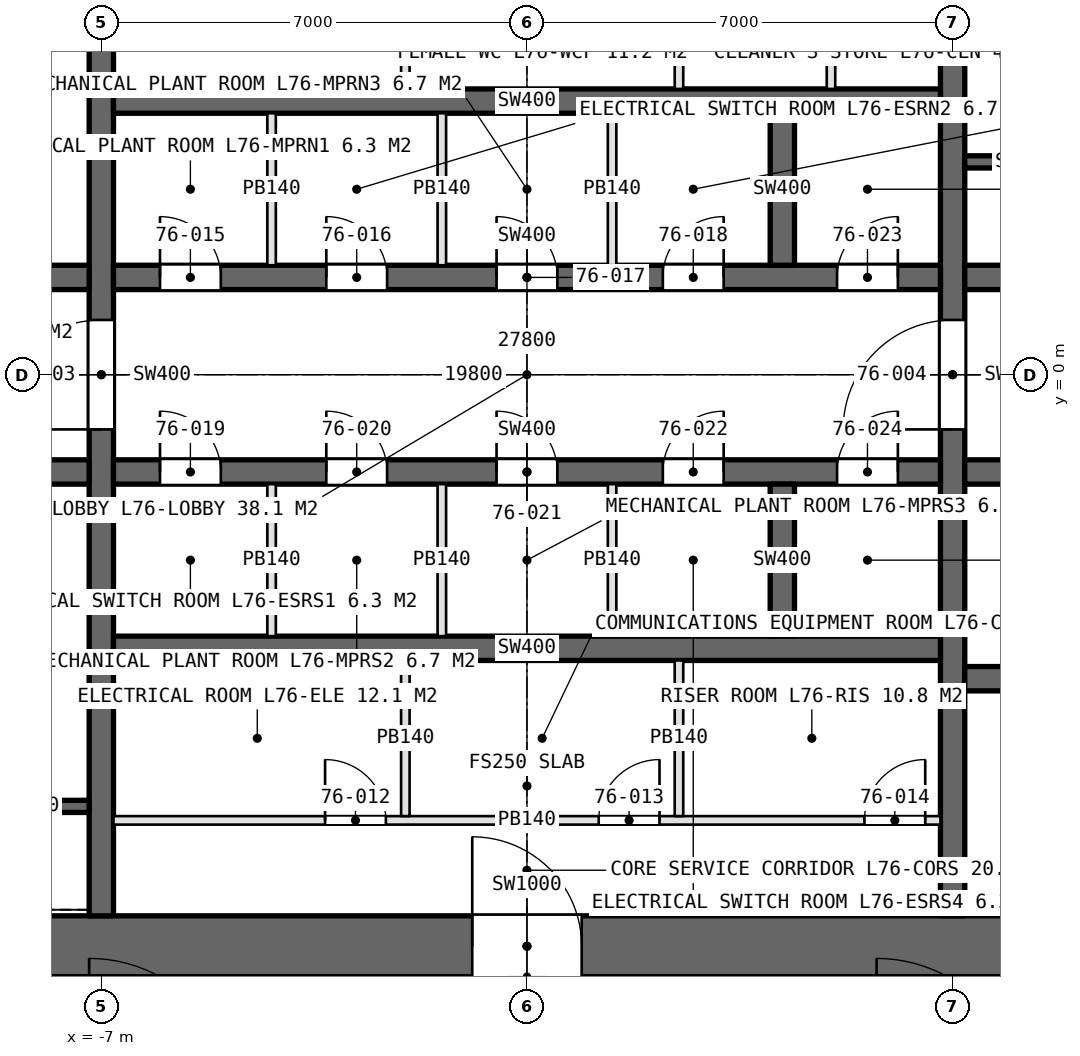
"""IFC4 building model, lengths in metres.
Left out: names, types, materials, properties, quantities, classifications, styles, units other than length and angle.
Written with IfcOpenShell. Run it as: python <this file> out.ifc"""

import sys

from ifc_helpers import new_model, si_unit, direction, frame, frame_2d, origin, place, context, subcontext, project, spatial, rectangle, extrude, element, fill, save


model = new_model("IFC4")
c1 = context("Model", 3, precision=1e-05, world=origin(), true_north=direction((0.0, 1.0)))
c2 = subcontext(c1, "Body", "Model", "MODEL_VIEW")
j1 = project(units=[si_unit("LENGTHUNIT", "METRE"), si_unit("PLANEANGLEUNIT", "RADIAN")], contexts=[c1])
p1 = place(None, origin())
s1 = spatial("IfcSite", under=j1, at=p1, CompositionType="ELEMENT")
p2 = place(p1, origin())
s2 = spatial("IfcBuilding", under=s1, at=p2, CompositionType="ELEMENT")
p3 = place(p2, frame((0.0, 0.0, 339.2)))
s3 = spatial("IfcBuildingStorey", under=s2, at=p3, CompositionType="ELEMENT", Elevation=339.2)
p4 = place(p3, frame((-13.9, -9.4, 0.0), z_axis=(0.0, 0.0, 1.0), x_axis=(1.0, 0.0, 0.0)))
e1 = element("IfcWall", 1, at=p4, inside=s3, PredefinedType="SHEAR", context=c2, shape_type="SweptSolid", body=[
    extrude(rectangle(XDim=27.8, YDim=1.0, at=frame_2d((13.9, 0.0))), origin(), (0.0, 0.0, 1.0), 5.0),
])
p5 = place(p4, frame((13.0, 0.0, 0.0)))
e2 = element("IfcOpeningElement", 2, at=p5, cuts=e1, PredefinedType="OPENING", context=c2, shape_type="SweptSolid", body=[
    extrude(rectangle(XDim=1.8, YDim=2.4, at=frame_2d((0.9, 1.2))), frame((0.0, 0.51, 0.0), z_axis=(0.0, -1.0, 0.0), x_axis=(1.0, 0.0, 0.0)), (0.0, 0.0, 1.0), 1.02),
])
p6 = place(p4, frame((22.95, 0.0, 0.0)))
e3 = element("IfcOpeningElement", 3, at=p6, cuts=e1, PredefinedType="OPENING", context=c2, shape_type="SweptSolid", body=[
    extrude(rectangle(XDim=2.2, YDim=2.7, at=frame_2d((1.1, 1.35))), frame((0.0, 0.51, 0.0), z_axis=(0.0, -1.0, 0.0), x_axis=(1.0, 0.0, 0.0)), (0.0, 0.0, 1.0), 1.02),
])
p7 = place(p3, frame((-7.0, -8.9, 0.0), z_axis=(0.0, 0.0, 1.0), x_axis=(0.0, 1.0, 0.0)))
e4 = element("IfcWall", 4, at=p7, inside=s3, PredefinedType="SHEAR", context=c2, shape_type="SweptSolid", body=[
    extrude(rectangle(XDim=17.8, YDim=0.4, at=frame_2d((8.9, 0.0))), origin(), (0.0, 0.0, 1.0), 5.0),
])
p8 = place(p7, frame((8.0, 0.0, 0.0)))
e5 = element("IfcOpeningElement", 5, at=p8, cuts=e4, PredefinedType="OPENING", context=c2, shape_type="SweptSolid", body=[
    extrude(rectangle(XDim=1.8, YDim=2.4, at=frame_2d((0.9, 1.2))), frame((0.0, 0.21, 0.0), z_axis=(0.0, -1.0, 0.0), x_axis=(1.0, 0.0, 0.0)), (0.0, 0.0, 1.0), 0.42),
])
p9 = place(p3, frame((7.0, -8.9, 0.0), z_axis=(0.0, 0.0, 1.0), x_axis=(0.0, 1.0, 0.0)))
e6 = element("IfcWall", 6, at=p9, inside=s3, PredefinedType="SHEAR", context=c2, shape_type="SweptSolid", body=[
    extrude(rectangle(XDim=17.8, YDim=0.4, at=frame_2d((8.9, 0.0))), origin(), (0.0, 0.0, 1.0), 5.0),
])
p10 = place(p9, frame((8.0, 0.0, 0.0)))
e7 = element("IfcOpeningElement", 7, at=p10, cuts=e6, PredefinedType="OPENING", context=c2, shape_type="SweptSolid", body=[
    extrude(rectangle(XDim=1.8, YDim=2.4, at=frame_2d((0.9, 1.2))), frame((0.0, 0.21, 0.0), z_axis=(0.0, -1.0, 0.0), x_axis=(1.0, 0.0, 0.0)), (0.0, 0.0, 1.0), 0.42),
])
p11 = place(p3, frame((-6.8, 1.6, 0.0), z_axis=(0.0, 0.0, 1.0), x_axis=(1.0, 0.0, 0.0)))
e8 = element("IfcWall", 8, at=p11, inside=s3, PredefinedType="SHEAR", context=c2, shape_type="SweptSolid", body=[
    extrude(rectangle(XDim=13.6, YDim=0.4, at=frame_2d((6.8, 0.0))), origin(), (0.0, 0.0, 1.0), 5.0),
])
p12 = place(p11, frame((0.765, 0.0, 0.0)))
e9 = element("IfcOpeningElement", 9, at=p12, cuts=e8, PredefinedType="OPENING", context=c2, shape_type="SweptSolid", body=[
    extrude(rectangle(XDim=1.0, YDim=2.4, at=frame_2d((0.5, 1.2))), frame((0.0, 0.21, 0.0), z_axis=(0.0, -1.0, 0.0), x_axis=(1.0, 0.0, 0.0)), (0.0, 0.0, 1.0), 0.42),
])
p13 = place(p11, frame((3.5, 0.0, 0.0)))
e10 = element("IfcOpeningElement", 10, at=p13, cuts=e8, PredefinedType="OPENING", context=c2, shape_type="SweptSolid", body=[
    extrude(rectangle(XDim=1.0, YDim=2.4, at=frame_2d((0.5, 1.2))), frame((0.0, 0.21, 0.0), z_axis=(0.0, -1.0, 0.0), x_axis=(1.0, 0.0, 0.0)), (0.0, 0.0, 1.0), 0.42),
])
p14 = place(p11, frame((6.3, 0.0, 0.0)))
e11 = element("IfcOpeningElement", 11, at=p14, cuts=e8, PredefinedType="OPENING", context=c2, shape_type="SweptSolid", body=[
    extrude(rectangle(XDim=1.0, YDim=2.4, at=frame_2d((0.5, 1.2))), frame((0.0, 0.21, 0.0), z_axis=(0.0, -1.0, 0.0), x_axis=(1.0, 0.0, 0.0)), (0.0, 0.0, 1.0), 0.42),
])
p15 = place(p11, frame((9.035, 0.0, 0.0)))
e12 = element("IfcOpeningElement", 12, at=p15, cuts=e8, PredefinedType="OPENING", context=c2, shape_type="SweptSolid", body=[
    extrude(rectangle(XDim=1.0, YDim=2.4, at=frame_2d((0.5, 1.2))), frame((0.0, 0.21, 0.0), z_axis=(0.0, -1.0, 0.0), x_axis=(1.0, 0.0, 0.0)), (0.0, 0.0, 1.0), 0.42),
])
p16 = place(p11, frame((11.9, 0.0, 0.0)))
e13 = element("IfcOpeningElement", 13, at=p16, cuts=e8, PredefinedType="OPENING", context=c2, shape_type="SweptSolid", body=[
    extrude(rectangle(XDim=1.0, YDim=2.4, at=frame_2d((0.5, 1.2))), frame((0.0, 0.21, 0.0), z_axis=(0.0, -1.0, 0.0), x_axis=(1.0, 0.0, 0.0)), (0.0, 0.0, 1.0), 0.42),
])
p17 = place(p3, frame((-6.8, -1.6, 0.0), z_axis=(0.0, 0.0, 1.0), x_axis=(1.0, 0.0, 0.0)))
e14 = element("IfcWall", 14, at=p17, inside=s3, PredefinedType="SHEAR", context=c2, shape_type="SweptSolid", body=[
    extrude(rectangle(XDim=13.6, YDim=0.4, at=frame_2d((6.8, 0.0))), origin(), (0.0, 0.0, 1.0), 5.0),
])
p18 = place(p17, frame((0.765, 0.0, 0.0)))
e15 = element("IfcOpeningElement", 15, at=p18, cuts=e14, PredefinedType="OPENING", context=c2, shape_type="SweptSolid", body=[
    extrude(rectangle(XDim=1.0, YDim=2.4, at=frame_2d((0.5, 1.2))), frame((0.0, 0.21, 0.0), z_axis=(0.0, -1.0, 0.0), x_axis=(1.0, 0.0, 0.0)), (0.0, 0.0, 1.0), 0.42),
])
p19 = place(p17, frame((3.5, 0.0, 0.0)))
e16 = element("IfcOpeningElement", 16, at=p19, cuts=e14, PredefinedType="OPENING", context=c2, shape_type="SweptSolid", body=[
    extrude(rectangle(XDim=1.0, YDim=2.4, at=frame_2d((0.5, 1.2))), frame((0.0, 0.21, 0.0), z_axis=(0.0, -1.0, 0.0), x_axis=(1.0, 0.0, 0.0)), (0.0, 0.0, 1.0), 0.42),
])
p20 = place(p17, frame((6.3, 0.0, 0.0)))
e17 = element("IfcOpeningElement", 17, at=p20, cuts=e14, PredefinedType="OPENING", context=c2, shape_type="SweptSolid", body=[
    extrude(rectangle(XDim=1.0, YDim=2.4, at=frame_2d((0.5, 1.2))), frame((0.0, 0.21, 0.0), z_axis=(0.0, -1.0, 0.0), x_axis=(1.0, 0.0, 0.0)), (0.0, 0.0, 1.0), 0.42),
])
p21 = place(p17, frame((9.035, 0.0, 0.0)))
e18 = element("IfcOpeningElement", 18, at=p21, cuts=e14, PredefinedType="OPENING", context=c2, shape_type="SweptSolid", body=[
    extrude(rectangle(XDim=1.0, YDim=2.4, at=frame_2d((0.5, 1.2))), frame((0.0, 0.21, 0.0), z_axis=(0.0, -1.0, 0.0), x_axis=(1.0, 0.0, 0.0)), (0.0, 0.0, 1.0), 0.42),
])
p22 = place(p17, frame((11.9, 0.0, 0.0)))
e19 = element("IfcOpeningElement", 19, at=p22, cuts=e14, PredefinedType="OPENING", context=c2, shape_type="SweptSolid", body=[
    extrude(rectangle(XDim=1.0, YDim=2.4, at=frame_2d((0.5, 1.2))), frame((0.0, 0.21, 0.0), z_axis=(0.0, -1.0, 0.0), x_axis=(1.0, 0.0, 0.0)), (0.0, 0.0, 1.0), 0.42),
])
for number, where, z_axis, x_axis in (
    (20, (-6.8, 4.5, 0.0), (0.0, 0.0, 1.0), (1.0, 0.0, 0.0)),
    (21, (-6.8, -4.5, 0.0), (0.0, 0.0, 1.0), (1.0, 0.0, 0.0)),
):
    element("IfcWall", number, at=place(p3, frame(where, z_axis=z_axis, x_axis=x_axis)), inside=s3, PredefinedType="SHEAR", context=c2, shape_type="SweptSolid", body=[
        extrude(rectangle(XDim=13.6, YDim=0.4, at=frame_2d((6.8, 0.0))), origin(), (0.0, 0.0, 1.0), 5.0),
    ])
for number, where, z_axis, x_axis in (
    (22, (-12.9, 1.6, 0.0), (0.0, 0.0, 1.0), (1.0, 0.0, 0.0)),
    (23, (-12.9, -1.6, 0.0), (0.0, 0.0, 1.0), (1.0, 0.0, 0.0)),
):
    element("IfcWall", number, at=place(p3, frame(where, z_axis=z_axis, x_axis=x_axis)), inside=s3, PredefinedType="SHEAR", context=c2, shape_type="SweptSolid", body=[
        extrude(rectangle(XDim=5.7, YDim=0.4, at=frame_2d((2.85, 0.0))), origin(), (0.0, 0.0, 1.0), 5.0),
    ])
p23 = place(p3, frame((7.2, 1.6, 0.0), z_axis=(0.0, 0.0, 1.0), x_axis=(1.0, 0.0, 0.0)))
e24 = element("IfcWall", 24, at=p23, inside=s3, PredefinedType="SHEAR", context=c2, shape_type="SweptSolid", body=[
    extrude(rectangle(XDim=5.7, YDim=0.4, at=frame_2d((2.85, 0.0))), origin(), (0.0, 0.0, 1.0), 5.0),
])
p24 = place(p23, frame((0.7, 0.0, 0.0)))
e25 = element("IfcOpeningElement", 25, at=p24, cuts=e24, PredefinedType="OPENING", context=c2, shape_type="SweptSolid", body=[
    extrude(rectangle(XDim=1.0, YDim=2.4, at=frame_2d((0.5, 1.2))), frame((0.0, 0.21, 0.0), z_axis=(0.0, -1.0, 0.0), x_axis=(1.0, 0.0, 0.0)), (0.0, 0.0, 1.0), 0.42),
])
p25 = place(p3, frame((7.2, -1.6, 0.0), z_axis=(0.0, 0.0, 1.0), x_axis=(1.0, 0.0, 0.0)))
e26 = element("IfcWall", 26, at=p25, inside=s3, PredefinedType="SHEAR", context=c2, shape_type="SweptSolid", body=[
    extrude(rectangle(XDim=5.7, YDim=0.4, at=frame_2d((2.85, 0.0))), origin(), (0.0, 0.0, 1.0), 5.0),
])
p26 = place(p25, frame((0.9, 0.0, 0.0)))
e27 = element("IfcOpeningElement", 27, at=p26, cuts=e26, PredefinedType="OPENING", context=c2, shape_type="SweptSolid", body=[
    extrude(rectangle(XDim=1.3, YDim=2.4, at=frame_2d((0.65, 1.2))), frame((0.0, 0.21, 0.0), z_axis=(0.0, -1.0, 0.0), x_axis=(1.0, 0.0, 0.0)), (0.0, 0.0, 1.0), 0.42),
])
p27 = place(p25, frame((3.95, 0.0, 0.0)))
e28 = element("IfcOpeningElement", 28, at=p27, cuts=e26, PredefinedType="OPENING", context=c2, shape_type="SweptSolid", body=[
    extrude(rectangle(XDim=1.3, YDim=2.4, at=frame_2d((0.65, 1.2))), frame((0.0, 0.21, 0.0), z_axis=(0.0, -1.0, 0.0), x_axis=(1.0, 0.0, 0.0)), (0.0, 0.0, 1.0), 0.42),
])
p28 = place(p3, frame((7.2, -5.0, 0.0), z_axis=(0.0, 0.0, 1.0), x_axis=(1.0, 0.0, 0.0)))
e29 = element("IfcWall", 29, at=p28, inside=s3, PredefinedType="SHEAR", context=c2, shape_type="SweptSolid", body=[
    extrude(rectangle(XDim=5.7, YDim=0.4, at=frame_2d((2.85, 0.0))), origin(), (0.0, 0.0, 1.0), 5.0),
])
for number, where, z_axis, x_axis in (
    (30, (4.2, 1.8, 0.0), (0.0, 0.0, 1.0), (0.0, 1.0, 0.0)),
    (31, (4.2, -4.3, 0.0), (0.0, 0.0, 1.0), (0.0, 1.0, 0.0)),
):
    element("IfcWall", number, at=place(p3, frame(where, z_axis=z_axis, x_axis=x_axis)), inside=s3, PredefinedType="SHEAR", context=c2, shape_type="SweptSolid", body=[
        extrude(rectangle(XDim=2.5, YDim=0.4, at=frame_2d((1.25, 0.0))), origin(), (0.0, 0.0, 1.0), 5.0),
    ])
for number, where, z_axis, x_axis in (
    (32, (-2.0, 4.7, 0.0), (0.0, 0.0, 1.0), (0.0, 1.0, 0.0)),
    (33, (2.5, 4.7, 0.0), (0.0, 0.0, 1.0), (0.0, 1.0, 0.0)),
    (34, (5.0, 4.7, 0.0), (0.0, 0.0, 1.0), (0.0, 1.0, 0.0)),
):
    element("IfcWall", number, at=place(p3, frame(where, z_axis=z_axis, x_axis=x_axis)), inside=s3, PredefinedType="PARTITIONING", context=c2, shape_type="SweptSolid", body=[
        extrude(rectangle(XDim=2.56, YDim=0.14, at=frame_2d((1.28, 0.0))), origin(), (0.0, 0.0, 1.0), 4.75),
    ])
p29 = place(p3, frame((-6.8, -7.33, 0.0), z_axis=(0.0, 0.0, 1.0), x_axis=(1.0, 0.0, 0.0)))
e35 = element("IfcWall", 35, at=p29, inside=s3, PredefinedType="PARTITIONING", context=c2, shape_type="SweptSolid", body=[
    extrude(rectangle(XDim=13.6, YDim=0.14, at=frame_2d((6.8, 0.0))), origin(), (0.0, 0.0, 1.0), 4.75),
])
p30 = place(p29, frame((3.48, 0.0, 0.0)))
e36 = element("IfcOpeningElement", 36, at=p30, cuts=e35, PredefinedType="OPENING", context=c2, shape_type="SweptSolid", body=[
    extrude(rectangle(XDim=1.0, YDim=2.4, at=frame_2d((0.5, 1.2))), frame((0.0, 0.08, 0.0), z_axis=(0.0, -1.0, 0.0), x_axis=(1.0, 0.0, 0.0)), (0.0, 0.0, 1.0), 0.16),
])
p31 = place(p29, frame((7.98, 0.0, 0.0)))
e37 = element("IfcOpeningElement", 37, at=p31, cuts=e35, PredefinedType="OPENING", context=c2, shape_type="SweptSolid", body=[
    extrude(rectangle(XDim=1.0, YDim=2.4, at=frame_2d((0.5, 1.2))), frame((0.0, 0.08, 0.0), z_axis=(0.0, -1.0, 0.0), x_axis=(1.0, 0.0, 0.0)), (0.0, 0.0, 1.0), 0.16),
])
p32 = place(p29, frame((12.35, 0.0, 0.0)))
e38 = element("IfcOpeningElement", 38, at=p32, cuts=e35, PredefinedType="OPENING", context=c2, shape_type="SweptSolid", body=[
    extrude(rectangle(XDim=1.0, YDim=2.4, at=frame_2d((0.5, 1.2))), frame((0.0, 0.08, 0.0), z_axis=(0.0, -1.0, 0.0), x_axis=(1.0, 0.0, 0.0)), (0.0, 0.0, 1.0), 0.16),
])
for number, where, z_axis, x_axis in (
    (39, (-2.0, -4.7, 0.0), (0.0, 0.0, 1.0), (0.0, -1.0, 0.0)),
    (40, (2.5, -4.7, 0.0), (0.0, 0.0, 1.0), (0.0, -1.0, 0.0)),
):
    element("IfcWall", number, at=place(p3, frame(where, z_axis=z_axis, x_axis=x_axis)), inside=s3, PredefinedType="PARTITIONING", context=c2, shape_type="SweptSolid", body=[
        extrude(rectangle(XDim=2.56, YDim=0.14, at=frame_2d((1.28, 0.0))), origin(), (0.0, 0.0, 1.0), 4.75),
    ])
for number, where, z_axis, x_axis in (
    (41, (-4.2, 1.8, 0.0), (0.0, 0.0, 1.0), (0.0, 1.0, 0.0)),
    (42, (-1.4, 1.8, 0.0), (0.0, 0.0, 1.0), (0.0, 1.0, 0.0)),
    (43, (1.4, 1.8, 0.0), (0.0, 0.0, 1.0), (0.0, 1.0, 0.0)),
    (44, (-4.2, -1.8, 0.0), (0.0, 0.0, 1.0), (0.0, -1.0, 0.0)),
    (45, (-1.4, -1.8, 0.0), (0.0, 0.0, 1.0), (0.0, -1.0, 0.0)),
    (46, (1.4, -1.8, 0.0), (0.0, 0.0, 1.0), (0.0, -1.0, 0.0)),
):
    element("IfcWall", number, at=place(p3, frame(where, z_axis=z_axis, x_axis=x_axis)), inside=s3, PredefinedType="PARTITIONING", context=c2, shape_type="SweptSolid", body=[
        extrude(rectangle(XDim=2.5, YDim=0.14, at=frame_2d((1.25, 0.0))), origin(), (0.0, 0.0, 1.0), 4.75),
    ])
for number, where, z_axis, x_axis in (
    (47, (-9.15, -7.1, 0.0), (0.0, 0.0, 1.0), (1.0, 0.0, 0.0)),
    (48, (9.15, 3.5, 0.0), (0.0, 0.0, 1.0), (-1.0, 0.0, 0.0)),
):
    element("IfcWall", number, at=place(p3, frame(where, z_axis=z_axis, x_axis=x_axis)), inside=s3, PredefinedType="SOLIDWALL", context=c2, shape_type="SweptSolid", body=[
        extrude(rectangle(XDim=1.95, YDim=0.2, at=frame_2d((0.975, 0.0))), origin(), (0.0, 0.0, 1.0), 5.0),
    ])
p33 = place(p8, origin())
e49 = element("IfcDoor", 49, at=p33, inside=s3, OperationType="DOUBLE_DOOR_SINGLE_SWING", PredefinedType="DOOR", context=c2, shape_type="SweptSolid", body=[
    extrude(rectangle(XDim=1.8, YDim=2.4, at=frame_2d((0.9, 1.2))), frame((0.0, 0.025, 0.0), z_axis=(0.0, -1.0, 0.0), x_axis=(1.0, 0.0, 0.0)), (0.0, 0.0, 1.0), 0.05),
])
fill(e5, e49)
p34 = place(p10, origin())
e50 = element("IfcDoor", 50, at=p34, inside=s3, OperationType="DOUBLE_DOOR_SINGLE_SWING", PredefinedType="DOOR", context=c2, shape_type="SweptSolid", body=[
    extrude(rectangle(XDim=1.8, YDim=2.4, at=frame_2d((0.9, 1.2))), frame((0.0, 0.025, 0.0), z_axis=(0.0, -1.0, 0.0), x_axis=(1.0, 0.0, 0.0)), (0.0, 0.0, 1.0), 0.05),
])
fill(e7, e50)
p35 = place(p30, origin())
e51 = element("IfcDoor", 51, at=p35, inside=s3, OperationType="SINGLE_SWING_LEFT", PredefinedType="DOOR", context=c2, shape_type="SweptSolid", body=[
    extrude(rectangle(XDim=1.0, YDim=2.4, at=frame_2d((0.5, 1.2))), frame((0.0, 0.025, 0.0), z_axis=(0.0, -1.0, 0.0), x_axis=(1.0, 0.0, 0.0)), (0.0, 0.0, 1.0), 0.05),
])
fill(e36, e51)
p36 = place(p31, origin())
e52 = element("IfcDoor", 52, at=p36, inside=s3, OperationType="SINGLE_SWING_RIGHT", PredefinedType="DOOR", context=c2, shape_type="SweptSolid", body=[
    extrude(rectangle(XDim=1.0, YDim=2.4, at=frame_2d((0.5, 1.2))), frame((0.0, 0.025, 0.0), z_axis=(0.0, -1.0, 0.0), x_axis=(1.0, 0.0, 0.0)), (0.0, 0.0, 1.0), 0.05),
])
fill(e37, e52)
p37 = place(p32, origin())
e53 = element("IfcDoor", 53, at=p37, inside=s3, OperationType="SINGLE_SWING_RIGHT", PredefinedType="DOOR", context=c2, shape_type="SweptSolid", body=[
    extrude(rectangle(XDim=1.0, YDim=2.4, at=frame_2d((0.5, 1.2))), frame((0.0, 0.025, 0.0), z_axis=(0.0, -1.0, 0.0), x_axis=(1.0, 0.0, 0.0)), (0.0, 0.0, 1.0), 0.05),
])
fill(e38, e53)
p38 = place(p12, origin())
e54 = element("IfcDoor", 54, at=p38, inside=s3, OperationType="SINGLE_SWING_LEFT", PredefinedType="DOOR", context=c2, shape_type="SweptSolid", body=[
    extrude(rectangle(XDim=1.0, YDim=2.4, at=frame_2d((0.5, 1.2))), frame((0.0, 0.025, 0.0), z_axis=(0.0, -1.0, 0.0), x_axis=(1.0, 0.0, 0.0)), (0.0, 0.0, 1.0), 0.05),
])
fill(e9, e54)
p39 = place(p13, origin())
e55 = element("IfcDoor", 55, at=p39, inside=s3, OperationType="SINGLE_SWING_LEFT", PredefinedType="DOOR", context=c2, shape_type="SweptSolid", body=[
    extrude(rectangle(XDim=1.0, YDim=2.4, at=frame_2d((0.5, 1.2))), frame((0.0, 0.025, 0.0), z_axis=(0.0, -1.0, 0.0), x_axis=(1.0, 0.0, 0.0)), (0.0, 0.0, 1.0), 0.05),
])
fill(e10, e55)
p40 = place(p14, origin())
e56 = element("IfcDoor", 56, at=p40, inside=s3, OperationType="SINGLE_SWING_LEFT", PredefinedType="DOOR", context=c2, shape_type="SweptSolid", body=[
    extrude(rectangle(XDim=1.0, YDim=2.4, at=frame_2d((0.5, 1.2))), frame((0.0, 0.025, 0.0), z_axis=(0.0, -1.0, 0.0), x_axis=(1.0, 0.0, 0.0)), (0.0, 0.0, 1.0), 0.05),
])
fill(e11, e56)
p41 = place(p15, origin())
e57 = element("IfcDoor", 57, at=p41, inside=s3, OperationType="SINGLE_SWING_RIGHT", PredefinedType="DOOR", context=c2, shape_type="SweptSolid", body=[
    extrude(rectangle(XDim=1.0, YDim=2.4, at=frame_2d((0.5, 1.2))), frame((0.0, 0.025, 0.0), z_axis=(0.0, -1.0, 0.0), x_axis=(1.0, 0.0, 0.0)), (0.0, 0.0, 1.0), 0.05),
])
fill(e12, e57)
p42 = place(p18, origin())
e58 = element("IfcDoor", 58, at=p42, inside=s3, OperationType="SINGLE_SWING_LEFT", PredefinedType="DOOR", context=c2, shape_type="SweptSolid", body=[
    extrude(rectangle(XDim=1.0, YDim=2.4, at=frame_2d((0.5, 1.2))), frame((0.0, 0.025, 0.0), z_axis=(0.0, -1.0, 0.0), x_axis=(1.0, 0.0, 0.0)), (0.0, 0.0, 1.0), 0.05),
])
fill(e15, e58)
p43 = place(p19, origin())
e59 = element("IfcDoor", 59, at=p43, inside=s3, OperationType="SINGLE_SWING_LEFT", PredefinedType="DOOR", context=c2, shape_type="SweptSolid", body=[
    extrude(rectangle(XDim=1.0, YDim=2.4, at=frame_2d((0.5, 1.2))), frame((0.0, 0.025, 0.0), z_axis=(0.0, -1.0, 0.0), x_axis=(1.0, 0.0, 0.0)), (0.0, 0.0, 1.0), 0.05),
])
fill(e16, e59)
p44 = place(p20, origin())
e60 = element("IfcDoor", 60, at=p44, inside=s3, OperationType="SINGLE_SWING_LEFT", PredefinedType="DOOR", context=c2, shape_type="SweptSolid", body=[
    extrude(rectangle(XDim=1.0, YDim=2.4, at=frame_2d((0.5, 1.2))), frame((0.0, 0.025, 0.0), z_axis=(0.0, -1.0, 0.0), x_axis=(1.0, 0.0, 0.0)), (0.0, 0.0, 1.0), 0.05),
])
fill(e17, e60)
p45 = place(p21, origin())
e61 = element("IfcDoor", 61, at=p45, inside=s3, OperationType="SINGLE_SWING_RIGHT", PredefinedType="DOOR", context=c2, shape_type="SweptSolid", body=[
    extrude(rectangle(XDim=1.0, YDim=2.4, at=frame_2d((0.5, 1.2))), frame((0.0, 0.025, 0.0), z_axis=(0.0, -1.0, 0.0), x_axis=(1.0, 0.0, 0.0)), (0.0, 0.0, 1.0), 0.05),
])
fill(e18, e61)
p46 = place(p16, origin())
e62 = element("IfcDoor", 62, at=p46, inside=s3, OperationType="SINGLE_SWING_RIGHT", PredefinedType="DOOR", context=c2, shape_type="SweptSolid", body=[
    extrude(rectangle(XDim=1.0, YDim=2.4, at=frame_2d((0.5, 1.2))), frame((0.0, 0.025, 0.0), z_axis=(0.0, -1.0, 0.0), x_axis=(1.0, 0.0, 0.0)), (0.0, 0.0, 1.0), 0.05),
])
fill(e13, e62)
p47 = place(p22, origin())
e63 = element("IfcDoor", 63, at=p47, inside=s3, OperationType="SINGLE_SWING_RIGHT", PredefinedType="DOOR", context=c2, shape_type="SweptSolid", body=[
    extrude(rectangle(XDim=1.0, YDim=2.4, at=frame_2d((0.5, 1.2))), frame((0.0, 0.025, 0.0), z_axis=(0.0, -1.0, 0.0), x_axis=(1.0, 0.0, 0.0)), (0.0, 0.0, 1.0), 0.05),
])
fill(e19, e63)
p48 = place(p5, origin())
e64 = element("IfcDoor", 64, at=p48, inside=s3, OperationType="DOUBLE_DOOR_SINGLE_SWING", PredefinedType="DOOR", context=c2, shape_type="SweptSolid", body=[
    extrude(rectangle(XDim=1.8, YDim=2.4, at=frame_2d((0.9, 1.2))), frame((0.0, 0.025, 0.0), z_axis=(0.0, -1.0, 0.0), x_axis=(1.0, 0.0, 0.0)), (0.0, 0.0, 1.0), 0.05),
])
fill(e2, e64)
save(model, sys.argv[1])
